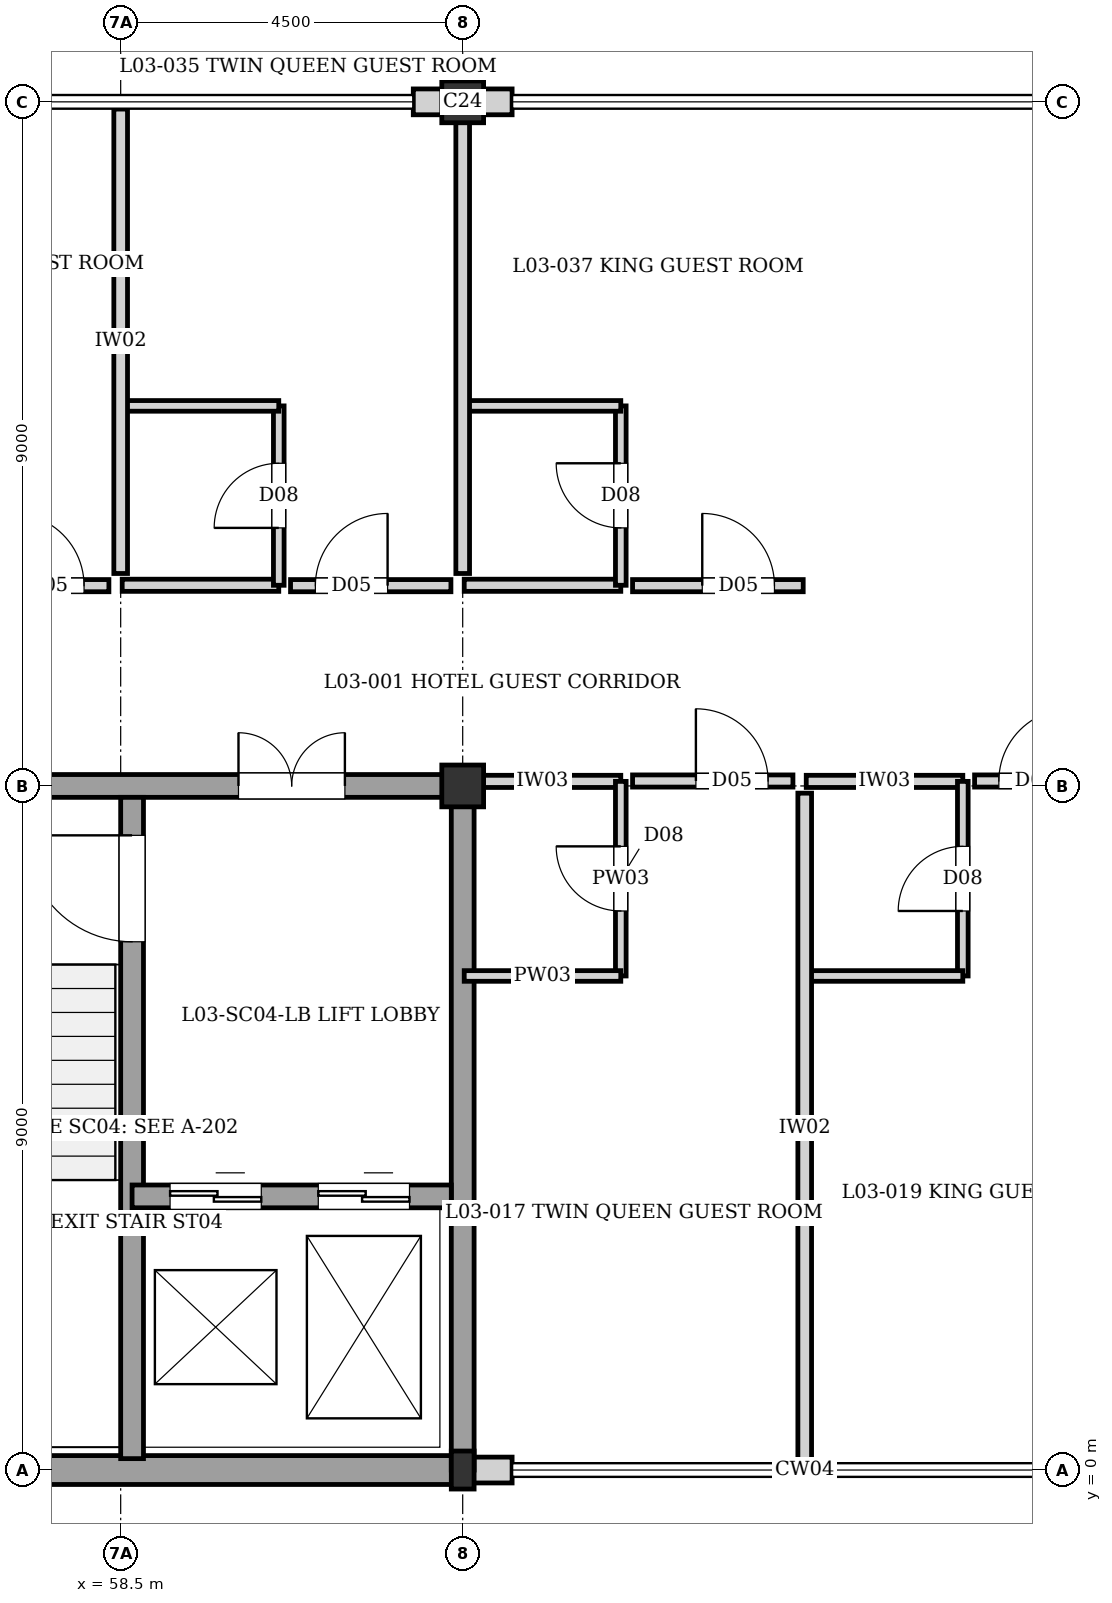
"""IFC4 building model, lengths in metres.
Left out: names, types, materials, properties, quantities, classifications, styles, units other than length and angle.
Written with IfcOpenShell. Run it as: python <this file> out.ifc"""

import sys

from ifc_helpers import new_model, si_unit, direction, frame, frame_2d, origin, origin_2d, place, context, subcontext, project, spatial, rectangle, i_section, extrude, element, fill, save


model = new_model("IFC4")
c1 = context("Model", 3, precision=1e-05, world=origin(), true_north=direction((0.0, 1.0)))
c2 = subcontext(c1, "Body", "Model", "MODEL_VIEW")
j1 = project(units=[si_unit("LENGTHUNIT", "METRE"), si_unit("PLANEANGLEUNIT", "RADIAN")], contexts=[c1])
p1 = place(None, origin())
s1 = spatial("IfcSite", under=j1, at=p1, CompositionType="ELEMENT")
p2 = place(p1, origin())
s2 = spatial("IfcBuilding", under=s1, at=p2, CompositionType="ELEMENT")
p3 = place(p2, frame((0.0, 0.0, 11.52)))
s3 = spatial("IfcBuildingStorey", under=s2, at=p3, CompositionType="ELEMENT", Elevation=11.52)
p4 = place(p3, frame((63.0, 0.0, 0.0), z_axis=(0.0, 0.0, 1.0), x_axis=(1.0, 0.0, 0.0)))
e1 = element("IfcColumn", 1, at=p4, inside=s3, PredefinedType="COLUMN", context=c2, shape_type="SweptSolid", body=[
    extrude(i_section(OverallWidth=0.3, OverallDepth=0.5, WebThickness=0.014, FlangeThickness=0.028, at=origin_2d()), origin(), (0.0, 0.0, 1.0), 3.04),
])
for number, where, z_axis, x_axis in (
    (2, (63.0, 9.0, 0.0), (0.0, 0.0, 1.0), (1.0, 0.0, 0.0)),
    (3, (63.0, 18.0, 0.0), (0.0, 0.0, 1.0), (1.0, 0.0, 0.0)),
):
    element("IfcColumn", number, at=place(p3, frame(where, z_axis=z_axis, x_axis=x_axis)), inside=s3, PredefinedType="COLUMN", context=c2, shape_type="SweptSolid", body=[
        extrude(rectangle(XDim=0.55, YDim=0.55, at=origin_2d()), origin(), (0.0, 0.0, 1.0), 3.04),
    ])
p5 = place(p3, frame((63.65, 0.0, 0.0), z_axis=(0.0, 0.0, 1.0), x_axis=(-1.0, 0.0, 0.0)))
e4 = element("IfcWall", 4, at=p5, inside=s3, PredefinedType="SOLIDWALL", context=c2, shape_type="SweptSolid", body=[
    extrude(rectangle(XDim=0.52, YDim=0.34, at=frame_2d((0.26, 0.0))), origin(), (0.0, 0.0, 1.0), 2.55),
])
p6 = place(p3, frame((63.0, 0.0, 0.0), z_axis=(0.0, 0.0, 1.0), x_axis=(-1.0, 0.0, 0.0)))
e5 = element("IfcWall", 5, at=p6, inside=s3, PredefinedType="SOLIDWALL", context=c2, shape_type="SweptSolid", body=[
    extrude(rectangle(XDim=9.0, YDim=0.38, at=frame_2d((4.5, 0.0))), origin(), (0.0, 0.0, 1.0), 2.82),
])
p7 = place(p3, frame((62.35, 18.0, 0.0), z_axis=(0.0, 0.0, 1.0), x_axis=(1.0, 0.0, 0.0)))
e6 = element("IfcWall", 6, at=p7, inside=s3, PredefinedType="SOLIDWALL", context=c2, shape_type="SweptSolid", body=[
    extrude(rectangle(XDim=0.65, YDim=0.34, at=frame_2d((0.325, 0.0))), origin(), (0.0, 0.0, 1.0), 2.38),
])
p8 = place(p3, frame((63.0, 18.0, 0.0), z_axis=(0.0, 0.0, 1.0), x_axis=(1.0, 0.0, 0.0)))
e7 = element("IfcWall", 7, at=p8, inside=s3, PredefinedType="SOLIDWALL", context=c2, shape_type="SweptSolid", body=[
    extrude(rectangle(XDim=0.65, YDim=0.34, at=frame_2d((0.325, 0.0))), origin(), (0.0, 0.0, 1.0), 2.55),
])
p9 = place(p3, frame((63.0, 0.0, 0.0), z_axis=(0.0, 0.0, 1.0), x_axis=(0.0, 1.0, 0.0)))
e8 = element("IfcWall", 8, at=p9, inside=s3, PredefinedType="SHEAR", context=c2, shape_type="SweptSolid", body=[
    extrude(rectangle(XDim=9.0, YDim=0.3, at=frame_2d((4.5, 0.0))), origin(), (0.0, 0.0, 1.0), 2.82),
])
p10 = place(p3, frame((54.0, 9.0, 0.0), z_axis=(0.0, 0.0, 1.0), x_axis=(1.0, 0.0, 0.0)))
e9 = element("IfcWall", 9, at=p10, inside=s3, PredefinedType="SHEAR", context=c2, shape_type="SweptSolid", body=[
    extrude(rectangle(XDim=9.0, YDim=0.3, at=frame_2d((4.5, 0.0))), origin(), (0.0, 0.0, 1.0), 2.82),
])
p11 = place(p10, frame((6.05, 0.0, 0.0)))
e10 = element("IfcOpeningElement", 10, at=p11, cuts=e9, PredefinedType="OPENING", context=c2, shape_type="SweptSolid", body=[
    extrude(rectangle(XDim=1.4, YDim=2.02, at=frame_2d((0.7, 1.01))), frame((0.0, 0.16, 0.0), z_axis=(0.0, -1.0, 0.0), x_axis=(1.0, 0.0, 0.0)), (0.0, 0.0, 1.0), 0.32),
])
p12 = place(p3, frame((58.65, 0.15, 0.0), z_axis=(0.0, 0.0, 1.0), x_axis=(0.0, 1.0, 0.0)))
e11 = element("IfcWall", 11, at=p12, inside=s3, PredefinedType="SHEAR", context=c2, shape_type="SweptSolid", body=[
    extrude(rectangle(XDim=8.7, YDim=0.3, at=frame_2d((4.35, 0.0))), origin(), (0.0, 0.0, 1.0), 2.82),
])
p13 = place(p12, frame((6.8, 0.0, 0.0)))
e12 = element("IfcOpeningElement", 12, at=p13, cuts=e11, PredefinedType="OPENING", context=c2, shape_type="SweptSolid", body=[
    extrude(rectangle(XDim=1.4, YDim=2.02, at=frame_2d((0.7, 1.01))), frame((0.0, 0.16, 0.0), z_axis=(0.0, -1.0, 0.0), x_axis=(1.0, 0.0, 0.0)), (0.0, 0.0, 1.0), 0.32),
])
p14 = place(p3, frame((58.65, 3.6, 0.0), z_axis=(0.0, 0.0, 1.0), x_axis=(1.0, 0.0, 0.0)))
e13 = element("IfcWall", 13, at=p14, inside=s3, PredefinedType="SHEAR", context=c2, shape_type="SweptSolid", body=[
    extrude(rectangle(XDim=4.2, YDim=0.3, at=frame_2d((2.1, 0.0))), origin(), (0.0, 0.0, 1.0), 2.82),
])
p15 = place(p14, frame((0.5, 0.0, 0.0)))
e14 = element("IfcOpeningElement", 14, at=p15, cuts=e13, PredefinedType="OPENING", context=c2, shape_type="SweptSolid", body=[
    extrude(rectangle(XDim=1.2, YDim=2.2, at=frame_2d((0.6, 1.1))), frame((0.0, 0.16, 0.0), z_axis=(0.0, -1.0, 0.0), x_axis=(1.0, 0.0, 0.0)), (0.0, 0.0, 1.0), 0.32),
])
p16 = place(p14, frame((2.45, 0.0, 0.0)))
e15 = element("IfcOpeningElement", 15, at=p16, cuts=e13, PredefinedType="OPENING", context=c2, shape_type="SweptSolid", body=[
    extrude(rectangle(XDim=1.2, YDim=2.2, at=frame_2d((0.6, 1.1))), frame((0.0, 0.16, 0.0), z_axis=(0.0, -1.0, 0.0), x_axis=(1.0, 0.0, 0.0)), (0.0, 0.0, 1.0), 0.32),
])
p17 = place(p3, frame((63.02, 9.06, 0.0), z_axis=(0.0, 0.0, 1.0), x_axis=(1.0, 0.0, 0.0)))
e16 = element("IfcWall", 16, at=p17, inside=s3, PredefinedType="PARTITIONING", context=c2, shape_type="SweptSolid", body=[
    extrude(rectangle(XDim=2.06, YDim=0.16, at=frame_2d((1.03, 0.0))), origin(), (0.0, 0.0, 1.0), 2.38),
])
p18 = place(p3, frame((65.08, 6.5, 0.0), z_axis=(0.0, 0.0, 1.0), x_axis=(0.0, 1.0, 0.0)))
e17 = element("IfcWall", 17, at=p18, inside=s3, PredefinedType="PLUMBINGWALL", context=c2, shape_type="SweptSolid", body=[
    extrude(rectangle(XDim=2.56, YDim=0.14, at=frame_2d((1.28, 0.0))), origin(), (0.0, 0.0, 1.0), 2.82),
])
p19 = place(p18, frame((0.855, 0.0, 0.0)))
e18 = element("IfcOpeningElement", 18, at=p19, cuts=e17, PredefinedType="OPENING", context=c2, shape_type="SweptSolid", body=[
    extrude(rectangle(XDim=0.85, YDim=2.04, at=frame_2d((0.425, 1.02))), frame((0.0, 0.08, 0.0), z_axis=(0.0, -1.0, 0.0), x_axis=(1.0, 0.0, 0.0)), (0.0, 0.0, 1.0), 0.16),
])
p20 = place(p3, frame((63.02, 6.5, 0.0), z_axis=(0.0, 0.0, 1.0), x_axis=(1.0, 0.0, 0.0)))
e19 = element("IfcWall", 19, at=p20, inside=s3, PredefinedType="PLUMBINGWALL", context=c2, shape_type="SweptSolid", body=[
    extrude(rectangle(XDim=2.06, YDim=0.14, at=frame_2d((1.03, 0.0))), origin(), (0.0, 0.0, 1.0), 2.82),
])
p21 = place(p3, frame((67.52, 9.06, 0.0), z_axis=(0.0, 0.0, 1.0), x_axis=(1.0, 0.0, 0.0)))
e20 = element("IfcWall", 20, at=p21, inside=s3, PredefinedType="PARTITIONING", context=c2, shape_type="SweptSolid", body=[
    extrude(rectangle(XDim=2.06, YDim=0.16, at=frame_2d((1.03, 0.0))), origin(), (0.0, 0.0, 1.0), 2.38),
])
p22 = place(p3, frame((69.58, 6.5, 0.0), z_axis=(0.0, 0.0, 1.0), x_axis=(0.0, 1.0, 0.0)))
e21 = element("IfcWall", 21, at=p22, inside=s3, PredefinedType="PLUMBINGWALL", context=c2, shape_type="SweptSolid", body=[
    extrude(rectangle(XDim=2.56, YDim=0.14, at=frame_2d((1.28, 0.0))), origin(), (0.0, 0.0, 1.0), 2.82),
])
p23 = place(p22, frame((0.855, 0.0, 0.0)))
e22 = element("IfcOpeningElement", 22, at=p23, cuts=e21, PredefinedType="OPENING", context=c2, shape_type="SweptSolid", body=[
    extrude(rectangle(XDim=0.85, YDim=2.04, at=frame_2d((0.425, 1.02))), frame((0.0, 0.08, 0.0), z_axis=(0.0, -1.0, 0.0), x_axis=(1.0, 0.0, 0.0)), (0.0, 0.0, 1.0), 0.16),
])
p24 = place(p3, frame((67.52, 6.5, 0.0), z_axis=(0.0, 0.0, 1.0), x_axis=(1.0, 0.0, 0.0)))
e23 = element("IfcWall", 23, at=p24, inside=s3, PredefinedType="PLUMBINGWALL", context=c2, shape_type="SweptSolid", body=[
    extrude(rectangle(XDim=2.06, YDim=0.14, at=frame_2d((1.03, 0.0))), origin(), (0.0, 0.0, 1.0), 2.82),
])
p25 = place(p3, frame((58.52, 11.64, 0.0), z_axis=(0.0, 0.0, 1.0), x_axis=(1.0, 0.0, 0.0)))
e24 = element("IfcWall", 24, at=p25, inside=s3, PredefinedType="PARTITIONING", context=c2, shape_type="SweptSolid", body=[
    extrude(rectangle(XDim=2.06, YDim=0.16, at=frame_2d((1.03, 0.0))), origin(), (0.0, 0.0, 1.0), 2.82),
])
p26 = place(p3, frame((60.58, 11.64, 0.0), z_axis=(0.0, 0.0, 1.0), x_axis=(0.0, 1.0, 0.0)))
e25 = element("IfcWall", 25, at=p26, inside=s3, PredefinedType="PLUMBINGWALL", context=c2, shape_type="SweptSolid", body=[
    extrude(rectangle(XDim=2.36, YDim=0.14, at=frame_2d((1.18, 0.0))), origin(), (0.0, 0.0, 1.0), 2.82),
])
p27 = place(p26, frame((0.755, 0.0, 0.0)))
e26 = element("IfcOpeningElement", 26, at=p27, cuts=e25, PredefinedType="OPENING", context=c2, shape_type="SweptSolid", body=[
    extrude(rectangle(XDim=0.85, YDim=2.04, at=frame_2d((0.425, 1.02))), frame((0.0, 0.08, 0.0), z_axis=(0.0, -1.0, 0.0), x_axis=(1.0, 0.0, 0.0)), (0.0, 0.0, 1.0), 0.16),
])
p28 = place(p3, frame((58.52, 14.0, 0.0), z_axis=(0.0, 0.0, 1.0), x_axis=(1.0, 0.0, 0.0)))
e27 = element("IfcWall", 27, at=p28, inside=s3, PredefinedType="PLUMBINGWALL", context=c2, shape_type="SweptSolid", body=[
    extrude(rectangle(XDim=2.06, YDim=0.14, at=frame_2d((1.03, 0.0))), origin(), (0.0, 0.0, 1.0), 2.82),
])
p29 = place(p3, frame((63.02, 11.64, 0.0), z_axis=(0.0, 0.0, 1.0), x_axis=(1.0, 0.0, 0.0)))
e28 = element("IfcWall", 28, at=p29, inside=s3, PredefinedType="PARTITIONING", context=c2, shape_type="SweptSolid", body=[
    extrude(rectangle(XDim=2.06, YDim=0.16, at=frame_2d((1.03, 0.0))), origin(), (0.0, 0.0, 1.0), 2.82),
])
p30 = place(p3, frame((65.08, 11.64, 0.0), z_axis=(0.0, 0.0, 1.0), x_axis=(0.0, 1.0, 0.0)))
e29 = element("IfcWall", 29, at=p30, inside=s3, PredefinedType="PLUMBINGWALL", context=c2, shape_type="SweptSolid", body=[
    extrude(rectangle(XDim=2.36, YDim=0.14, at=frame_2d((1.18, 0.0))), origin(), (0.0, 0.0, 1.0), 2.82),
])
p31 = place(p30, frame((0.755, 0.0, 0.0)))
e30 = element("IfcOpeningElement", 30, at=p31, cuts=e29, PredefinedType="OPENING", context=c2, shape_type="SweptSolid", body=[
    extrude(rectangle(XDim=0.85, YDim=2.04, at=frame_2d((0.425, 1.02))), frame((0.0, 0.08, 0.0), z_axis=(0.0, -1.0, 0.0), x_axis=(1.0, 0.0, 0.0)), (0.0, 0.0, 1.0), 0.16),
])
p32 = place(p3, frame((63.02, 14.0, 0.0), z_axis=(0.0, 0.0, 1.0), x_axis=(1.0, 0.0, 0.0)))
e31 = element("IfcWall", 31, at=p32, inside=s3, PredefinedType="PLUMBINGWALL", context=c2, shape_type="SweptSolid", body=[
    extrude(rectangle(XDim=2.06, YDim=0.14, at=frame_2d((1.03, 0.0))), origin(), (0.0, 0.0, 1.0), 2.82),
])
p33 = place(p3, frame((67.5, 0.095, 0.0), z_axis=(0.0, 0.0, 1.0), x_axis=(0.0, 1.0, 0.0)))
e32 = element("IfcWall", 32, at=p33, inside=s3, PredefinedType="PARTITIONING", context=c2, shape_type="SweptSolid", body=[
    extrude(rectangle(XDim=8.81, YDim=0.18, at=frame_2d((4.405, 0.0))), origin(), (0.0, 0.0, 1.0), 2.82),
])
p34 = place(p3, frame((58.5, 11.795, 0.0), z_axis=(0.0, 0.0, 1.0), x_axis=(0.0, 1.0, 0.0)))
e33 = element("IfcWall", 33, at=p34, inside=s3, PredefinedType="PARTITIONING", context=c2, shape_type="SweptSolid", body=[
    extrude(rectangle(XDim=6.11, YDim=0.18, at=frame_2d((3.055, 0.0))), origin(), (0.0, 0.0, 1.0), 2.82),
])
p35 = place(p3, frame((63.0, 11.795, 0.0), z_axis=(0.0, 0.0, 1.0), x_axis=(0.0, 1.0, 0.0)))
e34 = element("IfcWall", 34, at=p35, inside=s3, PredefinedType="PARTITIONING", context=c2, shape_type="SweptSolid", body=[
    extrude(rectangle(XDim=6.03, YDim=0.18, at=frame_2d((3.015, 0.0))), origin(), (0.0, 0.0, 1.0), 2.09),
])
p36 = place(p3, frame((65.235, 9.065, 0.0), z_axis=(0.0, 0.0, 1.0), x_axis=(1.0, 0.0, 0.0)))
e35 = element("IfcWall", 35, at=p36, inside=s3, PredefinedType="PARTITIONING", context=c2, shape_type="SweptSolid", body=[
    extrude(rectangle(XDim=2.11, YDim=0.16, at=frame_2d((1.055, 0.0))), origin(), (0.0, 0.0, 1.0), 2.38),
])
p37 = place(p36, frame((0.833, 0.0, 0.0)))
e36 = element("IfcOpeningElement", 36, at=p37, cuts=e35, PredefinedType="OPENING", context=c2, shape_type="SweptSolid", body=[
    extrude(rectangle(XDim=0.95, YDim=2.15, at=frame_2d((0.475, 1.075))), frame((0.0, 0.09, 0.0), z_axis=(0.0, -1.0, 0.0), x_axis=(1.0, 0.0, 0.0)), (0.0, 0.0, 1.0), 0.18),
])
p38 = place(p3, frame((69.735, 9.065, 0.0), z_axis=(0.0, 0.0, 1.0), x_axis=(1.0, 0.0, 0.0)))
e37 = element("IfcWall", 37, at=p38, inside=s3, PredefinedType="PARTITIONING", context=c2, shape_type="SweptSolid", body=[
    extrude(rectangle(XDim=2.09, YDim=0.16, at=frame_2d((1.045, 0.0))), origin(), (0.0, 0.0, 1.0), 2.38),
])
p39 = place(p38, frame((0.319, 0.0, 0.0)))
e38 = element("IfcOpeningElement", 38, at=p39, cuts=e37, PredefinedType="OPENING", context=c2, shape_type="SweptSolid", body=[
    extrude(rectangle(XDim=0.95, YDim=2.15, at=frame_2d((0.475, 1.075))), frame((0.0, 0.09, 0.0), z_axis=(0.0, -1.0, 0.0), x_axis=(1.0, 0.0, 0.0)), (0.0, 0.0, 1.0), 0.18),
])
p40 = place(p3, frame((56.235, 11.635, 0.0), z_axis=(0.0, 0.0, 1.0), x_axis=(1.0, 0.0, 0.0)))
e39 = element("IfcWall", 39, at=p40, inside=s3, PredefinedType="PARTITIONING", context=c2, shape_type="SweptSolid", body=[
    extrude(rectangle(XDim=2.11, YDim=0.16, at=frame_2d((1.055, 0.0))), origin(), (0.0, 0.0, 1.0), 2.82),
])
p41 = place(p40, frame((0.833, 0.0, 0.0)))
e40 = element("IfcOpeningElement", 40, at=p41, cuts=e39, PredefinedType="OPENING", context=c2, shape_type="SweptSolid", body=[
    extrude(rectangle(XDim=0.95, YDim=2.15, at=frame_2d((0.475, 1.075))), frame((0.0, 0.09, 0.0), z_axis=(0.0, -1.0, 0.0), x_axis=(1.0, 0.0, 0.0)), (0.0, 0.0, 1.0), 0.18),
])
p42 = place(p3, frame((60.735, 11.635, 0.0), z_axis=(0.0, 0.0, 1.0), x_axis=(1.0, 0.0, 0.0)))
e41 = element("IfcWall", 41, at=p42, inside=s3, PredefinedType="PARTITIONING", context=c2, shape_type="SweptSolid", body=[
    extrude(rectangle(XDim=2.11, YDim=0.16, at=frame_2d((1.055, 0.0))), origin(), (0.0, 0.0, 1.0), 2.82),
])
p43 = place(p42, frame((0.327, 0.0, 0.0)))
e42 = element("IfcOpeningElement", 42, at=p43, cuts=e41, PredefinedType="OPENING", context=c2, shape_type="SweptSolid", body=[
    extrude(rectangle(XDim=0.95, YDim=2.15, at=frame_2d((0.475, 1.075))), frame((0.0, 0.09, 0.0), z_axis=(0.0, -1.0, 0.0), x_axis=(1.0, 0.0, 0.0)), (0.0, 0.0, 1.0), 0.18),
])
p44 = place(p3, frame((65.235, 11.635, 0.0), z_axis=(0.0, 0.0, 1.0), x_axis=(1.0, 0.0, 0.0)))
e43 = element("IfcWall", 43, at=p44, inside=s3, PredefinedType="PARTITIONING", context=c2, shape_type="SweptSolid", body=[
    extrude(rectangle(XDim=2.245, YDim=0.16, at=frame_2d((1.123, 0.0))), origin(), (0.0, 0.0, 1.0), 2.82),
])
p45 = place(p44, frame((0.917, 0.0, 0.0)))
e44 = element("IfcOpeningElement", 44, at=p45, cuts=e43, PredefinedType="OPENING", context=c2, shape_type="SweptSolid", body=[
    extrude(rectangle(XDim=0.95, YDim=2.15, at=frame_2d((0.475, 1.075))), frame((0.0, 0.09, 0.0), z_axis=(0.0, -1.0, 0.0), x_axis=(1.0, 0.0, 0.0)), (0.0, 0.0, 1.0), 0.18),
])
p46 = place(p11, origin())
e45 = element("IfcDoor", 45, at=p46, inside=s3, OperationType="DOUBLE_DOOR_SINGLE_SWING", PredefinedType="DOOR", context=c2, shape_type="SweptSolid", body=[
    extrude(rectangle(XDim=1.4, YDim=2.02, at=frame_2d((0.7, 1.01))), frame((0.0, 0.025, 0.0), z_axis=(0.0, -1.0, 0.0), x_axis=(1.0, 0.0, 0.0)), (0.0, 0.0, 1.0), 0.05),
])
fill(e10, e45)
p47 = place(p13, origin())
e46 = element("IfcDoor", 46, at=p47, inside=s3, OperationType="SINGLE_SWING_RIGHT", PredefinedType="DOOR", context=c2, shape_type="SweptSolid", body=[
    extrude(rectangle(XDim=1.4, YDim=2.02, at=frame_2d((0.7, 1.01))), frame((0.0, 0.025, 0.0), z_axis=(0.0, -1.0, 0.0), x_axis=(1.0, 0.0, 0.0)), (0.0, 0.0, 1.0), 0.05),
])
fill(e12, e46)
p48 = place(p15, origin())
e47 = element("IfcDoor", 47, at=p48, inside=s3, OperationType="DOUBLE_DOOR_SLIDING", PredefinedType="DOOR", context=c2, shape_type="SweptSolid", body=[
    extrude(rectangle(XDim=1.2, YDim=2.2, at=frame_2d((0.6, 1.1))), frame((0.0, 0.025, 0.0), z_axis=(0.0, -1.0, 0.0), x_axis=(1.0, 0.0, 0.0)), (0.0, 0.0, 1.0), 0.05),
])
fill(e14, e47)
p49 = place(p16, origin())
e48 = element("IfcDoor", 48, at=p49, inside=s3, OperationType="DOUBLE_DOOR_SLIDING", PredefinedType="DOOR", context=c2, shape_type="SweptSolid", body=[
    extrude(rectangle(XDim=1.2, YDim=2.2, at=frame_2d((0.6, 1.1))), frame((0.0, 0.025, 0.0), z_axis=(0.0, -1.0, 0.0), x_axis=(1.0, 0.0, 0.0)), (0.0, 0.0, 1.0), 0.05),
])
fill(e15, e48)
p50 = place(p19, origin())
e49 = element("IfcDoor", 49, at=p50, inside=s3, OperationType="SINGLE_SWING_RIGHT", PredefinedType="DOOR", context=c2, shape_type="SweptSolid", body=[
    extrude(rectangle(XDim=0.85, YDim=2.04, at=frame_2d((0.425, 1.02))), frame((0.0, 0.025, 0.0), z_axis=(0.0, -1.0, 0.0), x_axis=(1.0, 0.0, 0.0)), (0.0, 0.0, 1.0), 0.05),
])
fill(e18, e49)
p51 = place(p23, origin())
e50 = element("IfcDoor", 50, at=p51, inside=s3, OperationType="SINGLE_SWING_LEFT", PredefinedType="DOOR", context=c2, shape_type="SweptSolid", body=[
    extrude(rectangle(XDim=0.85, YDim=2.04, at=frame_2d((0.425, 1.02))), frame((0.0, 0.025, 0.0), z_axis=(0.0, -1.0, 0.0), x_axis=(1.0, 0.0, 0.0)), (0.0, 0.0, 1.0), 0.05),
])
fill(e22, e50)
p52 = place(p27, origin())
e51 = element("IfcDoor", 51, at=p52, inside=s3, OperationType="SINGLE_SWING_LEFT", PredefinedType="DOOR", context=c2, shape_type="SweptSolid", body=[
    extrude(rectangle(XDim=0.85, YDim=2.04, at=frame_2d((0.425, 1.02))), frame((0.0, 0.025, 0.0), z_axis=(0.0, -1.0, 0.0), x_axis=(1.0, 0.0, 0.0)), (0.0, 0.0, 1.0), 0.05),
])
fill(e26, e51)
p53 = place(p31, origin())
e52 = element("IfcDoor", 52, at=p53, inside=s3, OperationType="SINGLE_SWING_RIGHT", PredefinedType="DOOR", context=c2, shape_type="SweptSolid", body=[
    extrude(rectangle(XDim=0.85, YDim=2.04, at=frame_2d((0.425, 1.02))), frame((0.0, 0.025, 0.0), z_axis=(0.0, -1.0, 0.0), x_axis=(1.0, 0.0, 0.0)), (0.0, 0.0, 1.0), 0.05),
])
fill(e30, e52)
p54 = place(p37, origin())
e53 = element("IfcDoor", 53, at=p54, inside=s3, OperationType="SINGLE_SWING_LEFT", PredefinedType="DOOR", context=c2, shape_type="SweptSolid", body=[
    extrude(rectangle(XDim=0.95, YDim=2.15, at=frame_2d((0.475, 1.075))), frame((0.0, 0.025, 0.0), z_axis=(0.0, -1.0, 0.0), x_axis=(1.0, 0.0, 0.0)), (0.0, 0.0, 1.0), 0.05),
])
fill(e36, e53)
p55 = place(p39, origin())
e54 = element("IfcDoor", 54, at=p55, inside=s3, OperationType="SINGLE_SWING_RIGHT", PredefinedType="DOOR", context=c2, shape_type="SweptSolid", body=[
    extrude(rectangle(XDim=0.95, YDim=2.15, at=frame_2d((0.475, 1.075))), frame((0.0, 0.025, 0.0), z_axis=(0.0, -1.0, 0.0), x_axis=(1.0, 0.0, 0.0)), (0.0, 0.0, 1.0), 0.05),
])
fill(e38, e54)
p56 = place(p41, origin())
e55 = element("IfcDoor", 55, at=p56, inside=s3, OperationType="SINGLE_SWING_LEFT", PredefinedType="DOOR", context=c2, shape_type="SweptSolid", body=[
    extrude(rectangle(XDim=0.95, YDim=2.15, at=frame_2d((0.475, 1.075))), frame((0.0, 0.025, 0.0), z_axis=(0.0, -1.0, 0.0), x_axis=(1.0, 0.0, 0.0)), (0.0, 0.0, 1.0), 0.05),
])
fill(e40, e55)
p57 = place(p43, origin())
e56 = element("IfcDoor", 56, at=p57, inside=s3, OperationType="SINGLE_SWING_RIGHT", PredefinedType="DOOR", context=c2, shape_type="SweptSolid", body=[
    extrude(rectangle(XDim=0.95, YDim=2.15, at=frame_2d((0.475, 1.075))), frame((0.0, 0.025, 0.0), z_axis=(0.0, -1.0, 0.0), x_axis=(1.0, 0.0, 0.0)), (0.0, 0.0, 1.0), 0.05),
])
fill(e42, e56)
p58 = place(p45, origin())
e57 = element("IfcDoor", 57, at=p58, inside=s3, OperationType="SINGLE_SWING_LEFT", PredefinedType="DOOR", context=c2, shape_type="SweptSolid", body=[
    extrude(rectangle(XDim=0.95, YDim=2.15, at=frame_2d((0.475, 1.075))), frame((0.0, 0.025, 0.0), z_axis=(0.0, -1.0, 0.0), x_axis=(1.0, 0.0, 0.0)), (0.0, 0.0, 1.0), 0.05),
])
fill(e44, e57)
save(model, sys.argv[1])
